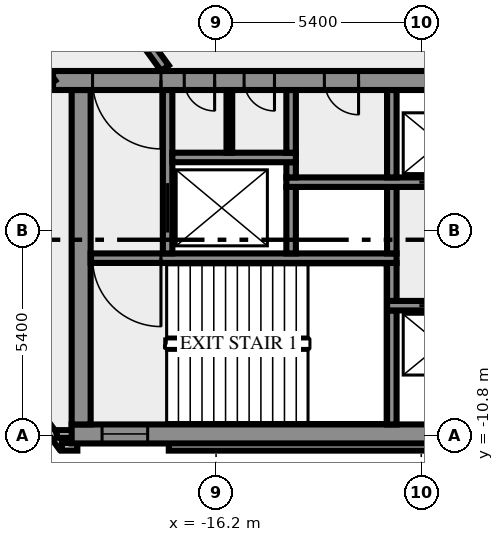
"""IFC4 building model, lengths in metres.
Left out: names, types, materials, properties, quantities, classifications, styles, units other than length and angle.
Written with IfcOpenShell. Run it as: python <this file> out.ifc"""

import sys

from ifc_helpers import new_model, si_unit, direction, frame, frame_2d, origin, place, context, subcontext, project, spatial, rectangle, extrude, element, fill, save


model = new_model("IFC4")
c1 = context("Model", 3, precision=1e-05, world=origin(), true_north=direction((0.0, 1.0)))
c2 = subcontext(c1, "Body", "Model", "MODEL_VIEW")
j1 = project(units=[si_unit("LENGTHUNIT", "METRE"), si_unit("PLANEANGLEUNIT", "RADIAN")], contexts=[c1])
p1 = place(None, origin())
s1 = spatial("IfcSite", under=j1, at=p1, CompositionType="ELEMENT")
p2 = place(p1, origin())
s2 = spatial("IfcBuilding", under=s1, at=p2, CompositionType="ELEMENT")
p3 = place(p2, frame((0.0, 0.0, 117.0)))
s3 = spatial("IfcBuildingStorey", under=s2, at=p3, CompositionType="ELEMENT", Elevation=117.0)
p4 = place(p3, frame((-21.833, -8.909, 0.0), z_axis=(0.0, 0.0, 1.0), x_axis=(0.587766567315, -0.809030569476, 0.0)))
e1 = element("IfcWall", 1, at=p4, inside=s3, PredefinedType="SOLIDWALL", context=c2, shape_type="SweptSolid", body=[
    extrude(rectangle(XDim=2.688, YDim=0.2, at=frame_2d((1.344, 0.0))), origin(), (0.0, 0.0, 1.0), 3.65),
])
p5 = place(p3, frame((-20.256, -11.088, 0.0), z_axis=(0.0, 0.0, 1.0), x_axis=(1.0, 0.0, 0.0)))
e2 = element("IfcWall", 2, at=p5, inside=s3, PredefinedType="SOLIDWALL", context=c2, shape_type="SweptSolid", body=[
    extrude(rectangle(XDim=0.406, YDim=0.2, at=frame_2d((0.203, 0.0))), origin(), (0.0, 0.0, 1.0), 3.65),
])
p6 = place(p3, frame((-17.444, -11.088, 0.0), z_axis=(0.0, 0.0, 1.0), x_axis=(1.0, 0.0, 0.0)))
e3 = element("IfcWall", 3, at=p6, inside=s3, PredefinedType="SOLIDWALL", context=c2, shape_type="SweptSolid", body=[
    extrude(rectangle(XDim=34.888, YDim=0.2, at=frame_2d((17.444, 0.0))), origin(), (0.0, 0.0, 1.0), 3.65),
])
p7 = place(p3, frame((-19.98, -10.75, 0.0), z_axis=(0.0, 0.0, 1.0), x_axis=(-1.0, 0.0, 0.0)))
e4 = element("IfcWall", 4, at=p7, inside=s3, PredefinedType="SOLIDWALL", context=c2, shape_type="SweptSolid", body=[
    extrude(rectangle(XDim=0.417, YDim=0.2, at=frame_2d((0.208, 0.0))), origin(), (0.0, 0.0, 1.0), 3.65),
])
p8 = place(p3, frame((-20.0, -10.75, 0.0), z_axis=(0.0, 0.0, 1.0), x_axis=(1.0, 0.0, 0.0)))
e5 = element("IfcWall", 5, at=p8, inside=s3, PredefinedType="SHEAR", context=c2, shape_type="SweptSolid", body=[
    extrude(rectangle(XDim=40.0, YDim=0.5, at=frame_2d((20.0, 0.0))), origin(), (0.0, 0.0, 1.0), 3.65),
])
p9 = place(p8, frame((0.8, 0.0, 1.0)))
e6 = element("IfcOpeningElement", 6, at=p9, cuts=e5, PredefinedType="OPENING", context=c2, shape_type="SweptSolid", body=[
    extrude(rectangle(XDim=1.2, YDim=1.2, at=frame_2d((0.6, 0.6))), frame((0.0, 0.26, 0.0), z_axis=(0.0, -1.0, 0.0), x_axis=(1.0, 0.0, 0.0)), (0.0, 0.0, 1.0), 0.52),
])
p10 = place(p8, frame((38.0, 0.0, 1.0)))
e7 = element("IfcOpeningElement", 7, at=p10, cuts=e5, PredefinedType="OPENING", context=c2, shape_type="SweptSolid", body=[
    extrude(rectangle(XDim=1.2, YDim=1.2, at=frame_2d((0.6, 0.6))), frame((0.0, 0.26, 0.0), z_axis=(0.0, -1.0, 0.0), x_axis=(1.0, 0.0, 0.0)), (0.0, 0.0, 1.0), 0.52),
])
p11 = place(p3, frame((-19.75, -10.5, 0.0), z_axis=(0.0, 0.0, 1.0), x_axis=(0.0, 1.0, 0.0)))
e8 = element("IfcWall", 8, at=p11, inside=s3, PredefinedType="SHEAR", context=c2, shape_type="SweptSolid", body=[
    extrude(rectangle(XDim=8.8, YDim=0.5, at=frame_2d((4.4, 0.0))), origin(), (0.0, 0.0, 1.0), 3.65),
])
p12 = place(p3, frame((-11.575, -10.5, 0.0), z_axis=(0.0, 0.0, 1.0), x_axis=(0.0, 1.0, 0.0)))
e9 = element("IfcWall", 9, at=p12, inside=s3, PredefinedType="SHEAR", context=c2, shape_type="SweptSolid", body=[
    extrude(rectangle(XDim=3.0, YDim=0.25, at=frame_2d((1.5, 0.0))), origin(), (0.0, 0.0, 1.0), 3.65),
])
p13 = place(p3, frame((11.7, -7.375, 0.0), z_axis=(0.0, 0.0, 1.0), x_axis=(-1.0, 0.0, 0.0)))
e10 = element("IfcWall", 10, at=p13, inside=s3, PredefinedType="SHEAR", context=c2, shape_type="SweptSolid", body=[
    extrude(rectangle(XDim=23.4, YDim=0.25, at=frame_2d((11.7, 0.0))), origin(), (0.0, 0.0, 1.0), 3.65),
])
p14 = place(p13, frame((21.45, 0.0, 0.0)))
e11 = element("IfcOpeningElement", 11, at=p14, cuts=e10, PredefinedType="OPENING", context=c2, shape_type="SweptSolid", body=[
    extrude(rectangle(XDim=1.1, YDim=2.1, at=frame_2d((0.55, 1.05))), frame((0.0, 0.135, 0.0), z_axis=(0.0, -1.0, 0.0), x_axis=(1.0, 0.0, 0.0)), (0.0, 0.0, 1.0), 0.27),
])
p15 = place(p13, frame((18.95, 0.0, 0.0)))
e12 = element("IfcOpeningElement", 12, at=p15, cuts=e10, PredefinedType="OPENING", context=c2, shape_type="SweptSolid", body=[
    extrude(rectangle(XDim=1.1, YDim=2.1, at=frame_2d((0.55, 1.05))), frame((0.0, 0.135, 0.0), z_axis=(0.0, -1.0, 0.0), x_axis=(1.0, 0.0, 0.0)), (0.0, 0.0, 1.0), 0.27),
])
p16 = place(p13, frame((16.45, 0.0, 0.0)))
e13 = element("IfcOpeningElement", 13, at=p16, cuts=e10, PredefinedType="OPENING", context=c2, shape_type="SweptSolid", body=[
    extrude(rectangle(XDim=1.1, YDim=2.1, at=frame_2d((0.55, 1.05))), frame((0.0, 0.135, 0.0), z_axis=(0.0, -1.0, 0.0), x_axis=(1.0, 0.0, 0.0)), (0.0, 0.0, 1.0), 0.27),
])
p17 = place(p13, frame((13.875, 0.0, 0.0)))
e14 = element("IfcOpeningElement", 14, at=p17, cuts=e10, PredefinedType="OPENING", context=c2, shape_type="SweptSolid", body=[
    extrude(rectangle(XDim=0.9, YDim=2.1, at=frame_2d((0.45, 1.05))), frame((0.0, 0.135, 0.0), z_axis=(0.0, -1.0, 0.0), x_axis=(1.0, 0.0, 0.0)), (0.0, 0.0, 1.0), 0.27),
])
p18 = place(p13, frame((11.1, 0.0, 0.0)))
e15 = element("IfcOpeningElement", 15, at=p18, cuts=e10, PredefinedType="OPENING", context=c2, shape_type="SweptSolid", body=[
    extrude(rectangle(XDim=0.9, YDim=2.1, at=frame_2d((0.45, 1.05))), frame((0.0, 0.135, 0.0), z_axis=(0.0, -1.0, 0.0), x_axis=(1.0, 0.0, 0.0)), (0.0, 0.0, 1.0), 0.27),
])
p19 = place(p3, frame((-11.575, -7.25, 0.0), z_axis=(0.0, 0.0, 1.0), x_axis=(0.0, 1.0, 0.0)))
e16 = element("IfcWall", 16, at=p19, inside=s3, PredefinedType="SHEAR", context=c2, shape_type="SweptSolid", body=[
    extrude(rectangle(XDim=1.0, YDim=0.25, at=frame_2d((0.5, 0.0))), origin(), (0.0, 0.0, 1.0), 3.65),
])
p20 = place(p3, frame((-11.45, -6.125, 0.0), z_axis=(0.0, 0.0, 1.0), x_axis=(-1.0, 0.0, 0.0)))
e17 = element("IfcWall", 17, at=p20, inside=s3, PredefinedType="SHEAR", context=c2, shape_type="SweptSolid", body=[
    extrude(rectangle(XDim=8.05, YDim=0.25, at=frame_2d((4.025, 0.0))), origin(), (0.0, 0.0, 1.0), 3.65),
])
p21 = place(p20, frame((6.2, 0.0, 0.0)))
e18 = element("IfcOpeningElement", 18, at=p21, cuts=e17, PredefinedType="OPENING", context=c2, shape_type="SweptSolid", body=[
    extrude(rectangle(XDim=1.8, YDim=2.1, at=frame_2d((0.9, 1.05))), frame((0.0, 0.135, 0.0), z_axis=(0.0, -1.0, 0.0), x_axis=(1.0, 0.0, 0.0)), (0.0, 0.0, 1.0), 0.27),
])
p22 = place(p3, frame((-17.475, -6.0, 0.0), z_axis=(0.0, 0.0, 1.0), x_axis=(0.0, 1.0, 0.0)))
e19 = element("IfcWall", 19, at=p22, inside=s3, PredefinedType="SHEAR", context=c2, shape_type="SweptSolid", body=[
    extrude(rectangle(XDim=4.3, YDim=0.25, at=frame_2d((2.15, 0.0))), origin(), (0.0, 0.0, 1.0), 3.65),
])
p23 = place(p22, frame((0.55, 0.0, 0.0)))
e20 = element("IfcOpeningElement", 20, at=p23, cuts=e19, PredefinedType="OPENING", context=c2, shape_type="SweptSolid", body=[
    extrude(rectangle(XDim=1.3, YDim=2.1, at=frame_2d((0.65, 1.05))), frame((0.0, 0.135, 0.0), z_axis=(0.0, -1.0, 0.0), x_axis=(1.0, 0.0, 0.0)), (0.0, 0.0, 1.0), 0.27),
])
for number, where, z_axis, x_axis in (
    (21, (-14.225, -6.0, 0.0), (0.0, 0.0, 1.0), (0.0, 1.0, 0.0)),
    (22, (-11.575, -6.0, 0.0), (0.0, 0.0, 1.0), (0.0, 1.0, 0.0)),
):
    element("IfcWall", number, at=place(p3, frame(where, z_axis=z_axis, x_axis=x_axis)), inside=s3, PredefinedType="SHEAR", context=c2, shape_type="SweptSolid", body=[
        extrude(rectangle(XDim=1.75, YDim=0.25, at=frame_2d((0.875, 0.0))), origin(), (0.0, 0.0, 1.0), 3.65),
    ])
p24 = place(p3, frame((-14.35, -4.125, 0.0), z_axis=(0.0, 0.0, 1.0), x_axis=(1.0, 0.0, 0.0)))
e23 = element("IfcWall", 23, at=p24, inside=s3, PredefinedType="SHEAR", context=c2, shape_type="SweptSolid", body=[
    extrude(rectangle(XDim=10.4, YDim=0.25, at=frame_2d((5.2, 0.0))), origin(), (0.0, 0.0, 1.0), 3.65),
])
p25 = place(p24, frame((3.5, 0.0, 0.0)))
e24 = element("IfcOpeningElement", 24, at=p25, cuts=e23, PredefinedType="OPENING", context=c2, shape_type="SweptSolid", body=[
    extrude(rectangle(XDim=1.1, YDim=2.1, at=frame_2d((0.55, 1.05))), frame((0.0, 0.135, 0.0), z_axis=(0.0, -1.0, 0.0), x_axis=(1.0, 0.0, 0.0)), (0.0, 0.0, 1.0), 0.27),
])
p26 = place(p24, frame((6.0, 0.0, 0.0)))
e25 = element("IfcOpeningElement", 25, at=p26, cuts=e23, PredefinedType="OPENING", context=c2, shape_type="SweptSolid", body=[
    extrude(rectangle(XDim=1.1, YDim=2.1, at=frame_2d((0.55, 1.05))), frame((0.0, 0.135, 0.0), z_axis=(0.0, -1.0, 0.0), x_axis=(1.0, 0.0, 0.0)), (0.0, 0.0, 1.0), 0.27),
])
p27 = place(p24, frame((8.5, 0.0, 0.0)))
e26 = element("IfcOpeningElement", 26, at=p27, cuts=e23, PredefinedType="OPENING", context=c2, shape_type="SweptSolid", body=[
    extrude(rectangle(XDim=1.1, YDim=2.1, at=frame_2d((0.55, 1.05))), frame((0.0, 0.135, 0.0), z_axis=(0.0, -1.0, 0.0), x_axis=(1.0, 0.0, 0.0)), (0.0, 0.0, 1.0), 0.27),
])
p28 = place(p3, frame((-14.225, -4.0, 0.0), z_axis=(0.0, 0.0, 1.0), x_axis=(0.0, 1.0, 0.0)))
e27 = element("IfcWall", 27, at=p28, inside=s3, PredefinedType="SHEAR", context=c2, shape_type="SweptSolid", body=[
    extrude(rectangle(XDim=0.4, YDim=0.25, at=frame_2d((0.2, 0.0))), origin(), (0.0, 0.0, 1.0), 3.65),
])
p29 = place(p3, frame((-11.575, -4.0, 0.0), z_axis=(0.0, 0.0, 1.0), x_axis=(0.0, 1.0, 0.0)))
e28 = element("IfcWall", 28, at=p29, inside=s3, PredefinedType="SHEAR", context=c2, shape_type="SweptSolid", body=[
    extrude(rectangle(XDim=2.3, YDim=0.25, at=frame_2d((1.15, 0.0))), origin(), (0.0, 0.0, 1.0), 3.65),
])
p30 = place(p3, frame((-17.35, -3.475, 0.0), z_axis=(0.0, 0.0, 1.0), x_axis=(1.0, 0.0, 0.0)))
e29 = element("IfcWall", 29, at=p30, inside=s3, PredefinedType="SHEAR", context=c2, shape_type="SweptSolid", body=[
    extrude(rectangle(XDim=3.25, YDim=0.25, at=frame_2d((1.625, 0.0))), origin(), (0.0, 0.0, 1.0), 3.65),
])
p31 = place(p3, frame((-15.85, -3.35, 0.0), z_axis=(0.0, 0.0, 1.0), x_axis=(0.0, 1.0, 0.0)))
e30 = element("IfcWall", 30, at=p31, inside=s3, PredefinedType="PARTITIONING", context=c2, shape_type="SweptSolid", body=[
    extrude(rectangle(XDim=1.65, YDim=0.15, at=frame_2d((0.825, 0.0))), origin(), (0.0, 0.0, 1.0), 3.65),
])
p32 = place(p3, frame((-14.225, -3.35, 0.0), z_axis=(0.0, 0.0, 1.0), x_axis=(0.0, 1.0, 0.0)))
e31 = element("IfcWall", 31, at=p32, inside=s3, PredefinedType="SHEAR", context=c2, shape_type="SweptSolid", body=[
    extrude(rectangle(XDim=1.65, YDim=0.25, at=frame_2d((0.825, 0.0))), origin(), (0.0, 0.0, 1.0), 3.65),
])
p33 = place(p3, frame((20.49, -1.45, 0.0), z_axis=(0.0, 0.0, 1.0), x_axis=(-1.0, 0.0, 0.0)))
e32 = element("IfcWall", 32, at=p33, inside=s3, PredefinedType="SHEAR", context=c2, shape_type="SweptSolid", body=[
    extrude(rectangle(XDim=40.98, YDim=0.5, at=frame_2d((20.49, 0.0))), origin(), (0.0, 0.0, 1.0), 3.65),
])
p34 = place(p33, frame((38.14, 0.0, 0.0)))
e33 = element("IfcOpeningElement", 33, at=p34, cuts=e32, PredefinedType="OPENING", context=c2, shape_type="SweptSolid", body=[
    extrude(rectangle(XDim=1.8, YDim=2.1, at=frame_2d((0.9, 1.05))), frame((0.0, 0.26, 0.0), z_axis=(0.0, -1.0, 0.0), x_axis=(1.0, 0.0, 0.0)), (0.0, 0.0, 1.0), 0.52),
])
p35 = place(p33, frame((36.728, 0.0, 0.0)))
e34 = element("IfcOpeningElement", 34, at=p35, cuts=e32, PredefinedType="OPENING", context=c2, shape_type="SweptSolid", body=[
    extrude(rectangle(XDim=0.8, YDim=2.1, at=frame_2d((0.4, 1.05))), frame((0.0, 0.26, 0.0), z_axis=(0.0, -1.0, 0.0), x_axis=(1.0, 0.0, 0.0)), (0.0, 0.0, 1.0), 0.52),
])
p36 = place(p33, frame((35.153, 0.0, 0.0)))
e35 = element("IfcOpeningElement", 35, at=p36, cuts=e32, PredefinedType="OPENING", context=c2, shape_type="SweptSolid", body=[
    extrude(rectangle(XDim=0.8, YDim=2.1, at=frame_2d((0.4, 1.05))), frame((0.0, 0.26, 0.0), z_axis=(0.0, -1.0, 0.0), x_axis=(1.0, 0.0, 0.0)), (0.0, 0.0, 1.0), 0.52),
])
p37 = place(p33, frame((32.94, 0.0, 0.0)))
e36 = element("IfcOpeningElement", 36, at=p37, cuts=e32, PredefinedType="OPENING", context=c2, shape_type="SweptSolid", body=[
    extrude(rectangle(XDim=0.9, YDim=2.1, at=frame_2d((0.45, 1.05))), frame((0.0, 0.26, 0.0), z_axis=(0.0, -1.0, 0.0), x_axis=(1.0, 0.0, 0.0)), (0.0, 0.0, 1.0), 0.52),
])
p38 = place(p33, frame((21.765, 0.0, 0.0)))
e37 = element("IfcOpeningElement", 37, at=p38, cuts=e32, PredefinedType="OPENING", context=c2, shape_type="SweptSolid", body=[
    extrude(rectangle(XDim=2.0, YDim=2.1, at=frame_2d((1.0, 1.05))), frame((0.0, 0.26, 0.0), z_axis=(0.0, -1.0, 0.0), x_axis=(1.0, 0.0, 0.0)), (0.0, 0.0, 1.0), 0.52),
])
p39 = place(p33, frame((7.14, 0.0, 0.0)))
e38 = element("IfcOpeningElement", 38, at=p39, cuts=e32, PredefinedType="OPENING", context=c2, shape_type="SweptSolid", body=[
    extrude(rectangle(XDim=0.9, YDim=2.1, at=frame_2d((0.45, 1.05))), frame((0.0, 0.26, 0.0), z_axis=(0.0, -1.0, 0.0), x_axis=(1.0, 0.0, 0.0)), (0.0, 0.0, 1.0), 0.52),
])
p40 = place(p33, frame((4.19, 0.0, 0.0)))
e39 = element("IfcOpeningElement", 39, at=p40, cuts=e32, PredefinedType="OPENING", context=c2, shape_type="SweptSolid", body=[
    extrude(rectangle(XDim=0.9, YDim=2.1, at=frame_2d((0.45, 1.05))), frame((0.0, 0.26, 0.0), z_axis=(0.0, -1.0, 0.0), x_axis=(1.0, 0.0, 0.0)), (0.0, 0.0, 1.0), 0.52),
])
p41 = place(p33, frame((1.04, 0.0, 0.0)))
e40 = element("IfcOpeningElement", 40, at=p41, cuts=e32, PredefinedType="OPENING", context=c2, shape_type="SweptSolid", body=[
    extrude(rectangle(XDim=1.8, YDim=2.1, at=frame_2d((0.9, 1.05))), frame((0.0, 0.26, 0.0), z_axis=(0.0, -1.0, 0.0), x_axis=(1.0, 0.0, 0.0)), (0.0, 0.0, 1.0), 0.52),
])
p42 = place(p3, frame((-20.531, -1.523, 0.0), z_axis=(0.0, 0.0, 1.0), x_axis=(-0.587784522481, 0.809017524614, 0.0)))
e41 = element("IfcWall", 41, at=p42, inside=s3, PredefinedType="SOLIDWALL", context=c2, shape_type="SweptSolid", body=[
    extrude(rectangle(XDim=49.912, YDim=0.25, at=frame_2d((24.956, 0.0))), origin(), (0.0, 0.0, 1.0), 3.65),
])
p43 = place(p42, frame((10.266, 0.0, 0.0)))
e42 = element("IfcOpeningElement", 42, at=p43, cuts=e41, PredefinedType="OPENING", context=c2, shape_type="SweptSolid", body=[
    extrude(rectangle(XDim=0.9, YDim=2.1, at=frame_2d((0.45, 1.05))), frame((0.0, 0.135, 0.0), z_axis=(0.0, -1.0, 0.0), x_axis=(1.0, 0.0, 0.0)), (0.0, 0.0, 1.0), 0.27),
])
p44 = place(p42, frame((32.366, 0.0, 0.0)))
e43 = element("IfcOpeningElement", 43, at=p44, cuts=e41, PredefinedType="OPENING", context=c2, shape_type="SweptSolid", body=[
    extrude(rectangle(XDim=1.8, YDim=2.1, at=frame_2d((0.9, 1.05))), frame((0.0, 0.135, 0.0), z_axis=(0.0, -1.0, 0.0), x_axis=(1.0, 0.0, 0.0)), (0.0, 0.0, 1.0), 0.27),
])
p45 = place(p42, frame((11.815, 0.0, 0.0)))
e44 = element("IfcOpeningElement", 44, at=p45, cuts=e41, PredefinedType="OPENING", context=c2, shape_type="SweptSolid", body=[
    extrude(rectangle(XDim=1.8, YDim=2.1, at=frame_2d((0.9, 1.05))), frame((0.0, 0.135, 0.0), z_axis=(0.0, -1.0, 0.0), x_axis=(1.0, 0.0, 0.0)), (0.0, 0.0, 1.0), 0.27),
])
p46 = place(p42, frame((48.57, 0.0, 0.0)))
e45 = element("IfcOpeningElement", 45, at=p46, cuts=e41, PredefinedType="OPENING", context=c2, shape_type="SweptSolid", body=[
    extrude(rectangle(XDim=0.9, YDim=2.1, at=frame_2d((0.45, 1.05))), frame((0.0, 0.135, 0.0), z_axis=(0.0, -1.0, 0.0), x_axis=(1.0, 0.0, 0.0)), (0.0, 0.0, 1.0), 0.27),
])
p47 = place(p42, frame((35.915, 0.0, 0.0)))
e46 = element("IfcOpeningElement", 46, at=p47, cuts=e41, PredefinedType="OPENING", context=c2, shape_type="SweptSolid", body=[
    extrude(rectangle(XDim=0.9, YDim=2.1, at=frame_2d((0.45, 1.05))), frame((0.0, 0.135, 0.0), z_axis=(0.0, -1.0, 0.0), x_axis=(1.0, 0.0, 0.0)), (0.0, 0.0, 1.0), 0.27),
])
p48 = place(p3, frame((-37.232, 25.972, 0.0), z_axis=(0.0, 0.0, 1.0), x_axis=(0.587786323093, -0.809016216391, 0.0)))
e47 = element("IfcWall", 47, at=p48, inside=s3, PredefinedType="SOLIDWALL", context=c2, shape_type="SweptSolid", body=[
    extrude(rectangle(XDim=33.493, YDim=0.25, at=frame_2d((16.747, 0.0))), origin(), (0.0, 0.0, 1.0), 3.65),
])
p49 = place(p48, frame((5.385, 0.0, 0.0)))
e48 = element("IfcOpeningElement", 48, at=p49, cuts=e47, PredefinedType="OPENING", context=c2, shape_type="SweptSolid", body=[
    extrude(rectangle(XDim=0.9, YDim=2.1, at=frame_2d((0.45, 1.05))), frame((0.0, 0.135, 0.0), z_axis=(0.0, -1.0, 0.0), x_axis=(1.0, 0.0, 0.0)), (0.0, 0.0, 1.0), 0.27),
])
p50 = place(p48, frame((6.985, 0.0, 0.0)))
e49 = element("IfcOpeningElement", 49, at=p50, cuts=e47, PredefinedType="OPENING", context=c2, shape_type="SweptSolid", body=[
    extrude(rectangle(XDim=0.9, YDim=2.1, at=frame_2d((0.45, 1.05))), frame((0.0, 0.135, 0.0), z_axis=(0.0, -1.0, 0.0), x_axis=(1.0, 0.0, 0.0)), (0.0, 0.0, 1.0), 0.27),
])
p51 = place(p9, origin())
e50 = element("IfcWindow", 50, at=p51, inside=s3, PartitioningType="SINGLE_PANEL", PredefinedType="WINDOW", context=c2, shape_type="SweptSolid", body=[
    extrude(rectangle(XDim=1.2, YDim=1.2, at=frame_2d((0.6, 0.6))), frame((0.0, 0.03, 0.0), z_axis=(0.0, -1.0, 0.0), x_axis=(1.0, 0.0, 0.0)), (0.0, 0.0, 1.0), 0.06),
])
fill(e6, e50)
p52 = place(p14, origin())
e51 = element("IfcDoor", 51, at=p52, inside=s3, OperationType="DOUBLE_DOOR_SLIDING", PredefinedType="DOOR", context=c2, shape_type="SweptSolid", body=[
    extrude(rectangle(XDim=1.1, YDim=2.1, at=frame_2d((0.55, 1.05))), frame((0.0, 0.025, 0.0), z_axis=(0.0, -1.0, 0.0), x_axis=(1.0, 0.0, 0.0)), (0.0, 0.0, 1.0), 0.05),
])
fill(e11, e51)
p53 = place(p21, origin())
e52 = element("IfcDoor", 52, at=p53, inside=s3, OperationType="DOUBLE_DOOR_SINGLE_SWING", PredefinedType="DOOR", context=c2, shape_type="SweptSolid", body=[
    extrude(rectangle(XDim=1.8, YDim=2.1, at=frame_2d((0.9, 1.05))), frame((0.0, 0.025, 0.0), z_axis=(0.0, -1.0, 0.0), x_axis=(1.0, 0.0, 0.0)), (0.0, 0.0, 1.0), 0.05),
])
fill(e18, e52)
p54 = place(p23, origin())
e53 = element("IfcDoor", 53, at=p54, inside=s3, OperationType="DOUBLE_DOOR_SLIDING", PredefinedType="DOOR", context=c2, shape_type="SweptSolid", body=[
    extrude(rectangle(XDim=1.3, YDim=2.1, at=frame_2d((0.65, 1.05))), frame((0.0, 0.025, 0.0), z_axis=(0.0, -1.0, 0.0), x_axis=(1.0, 0.0, 0.0)), (0.0, 0.0, 1.0), 0.05),
])
fill(e20, e53)
p55 = place(p25, origin())
e54 = element("IfcDoor", 54, at=p55, inside=s3, OperationType="DOUBLE_DOOR_SLIDING", PredefinedType="DOOR", context=c2, shape_type="SweptSolid", body=[
    extrude(rectangle(XDim=1.1, YDim=2.1, at=frame_2d((0.55, 1.05))), frame((0.0, 0.025, 0.0), z_axis=(0.0, -1.0, 0.0), x_axis=(1.0, 0.0, 0.0)), (0.0, 0.0, 1.0), 0.05),
])
fill(e24, e54)
p56 = place(p34, origin())
e55 = element("IfcDoor", 55, at=p56, inside=s3, OperationType="DOUBLE_DOOR_SINGLE_SWING", PredefinedType="DOOR", context=c2, shape_type="SweptSolid", body=[
    extrude(rectangle(XDim=1.8, YDim=2.1, at=frame_2d((0.9, 1.05))), frame((0.0, 0.025, 0.0), z_axis=(0.0, -1.0, 0.0), x_axis=(1.0, 0.0, 0.0)), (0.0, 0.0, 1.0), 0.05),
])
fill(e33, e55)
p57 = place(p35, origin())
e56 = element("IfcDoor", 56, at=p57, inside=s3, OperationType="SINGLE_SWING_RIGHT", PredefinedType="DOOR", context=c2, shape_type="SweptSolid", body=[
    extrude(rectangle(XDim=0.8, YDim=2.1, at=frame_2d((0.4, 1.05))), frame((0.0, 0.025, 0.0), z_axis=(0.0, -1.0, 0.0), x_axis=(1.0, 0.0, 0.0)), (0.0, 0.0, 1.0), 0.05),
])
fill(e34, e56)
p58 = place(p36, origin())
e57 = element("IfcDoor", 57, at=p58, inside=s3, OperationType="SINGLE_SWING_RIGHT", PredefinedType="DOOR", context=c2, shape_type="SweptSolid", body=[
    extrude(rectangle(XDim=0.8, YDim=2.1, at=frame_2d((0.4, 1.05))), frame((0.0, 0.025, 0.0), z_axis=(0.0, -1.0, 0.0), x_axis=(1.0, 0.0, 0.0)), (0.0, 0.0, 1.0), 0.05),
])
fill(e35, e57)
p59 = place(p37, origin())
e58 = element("IfcDoor", 58, at=p59, inside=s3, OperationType="SINGLE_SWING_RIGHT", PredefinedType="DOOR", context=c2, shape_type="SweptSolid", body=[
    extrude(rectangle(XDim=0.9, YDim=2.1, at=frame_2d((0.45, 1.05))), frame((0.0, 0.025, 0.0), z_axis=(0.0, -1.0, 0.0), x_axis=(1.0, 0.0, 0.0)), (0.0, 0.0, 1.0), 0.05),
])
fill(e36, e58)
save(model, sys.argv[1])
